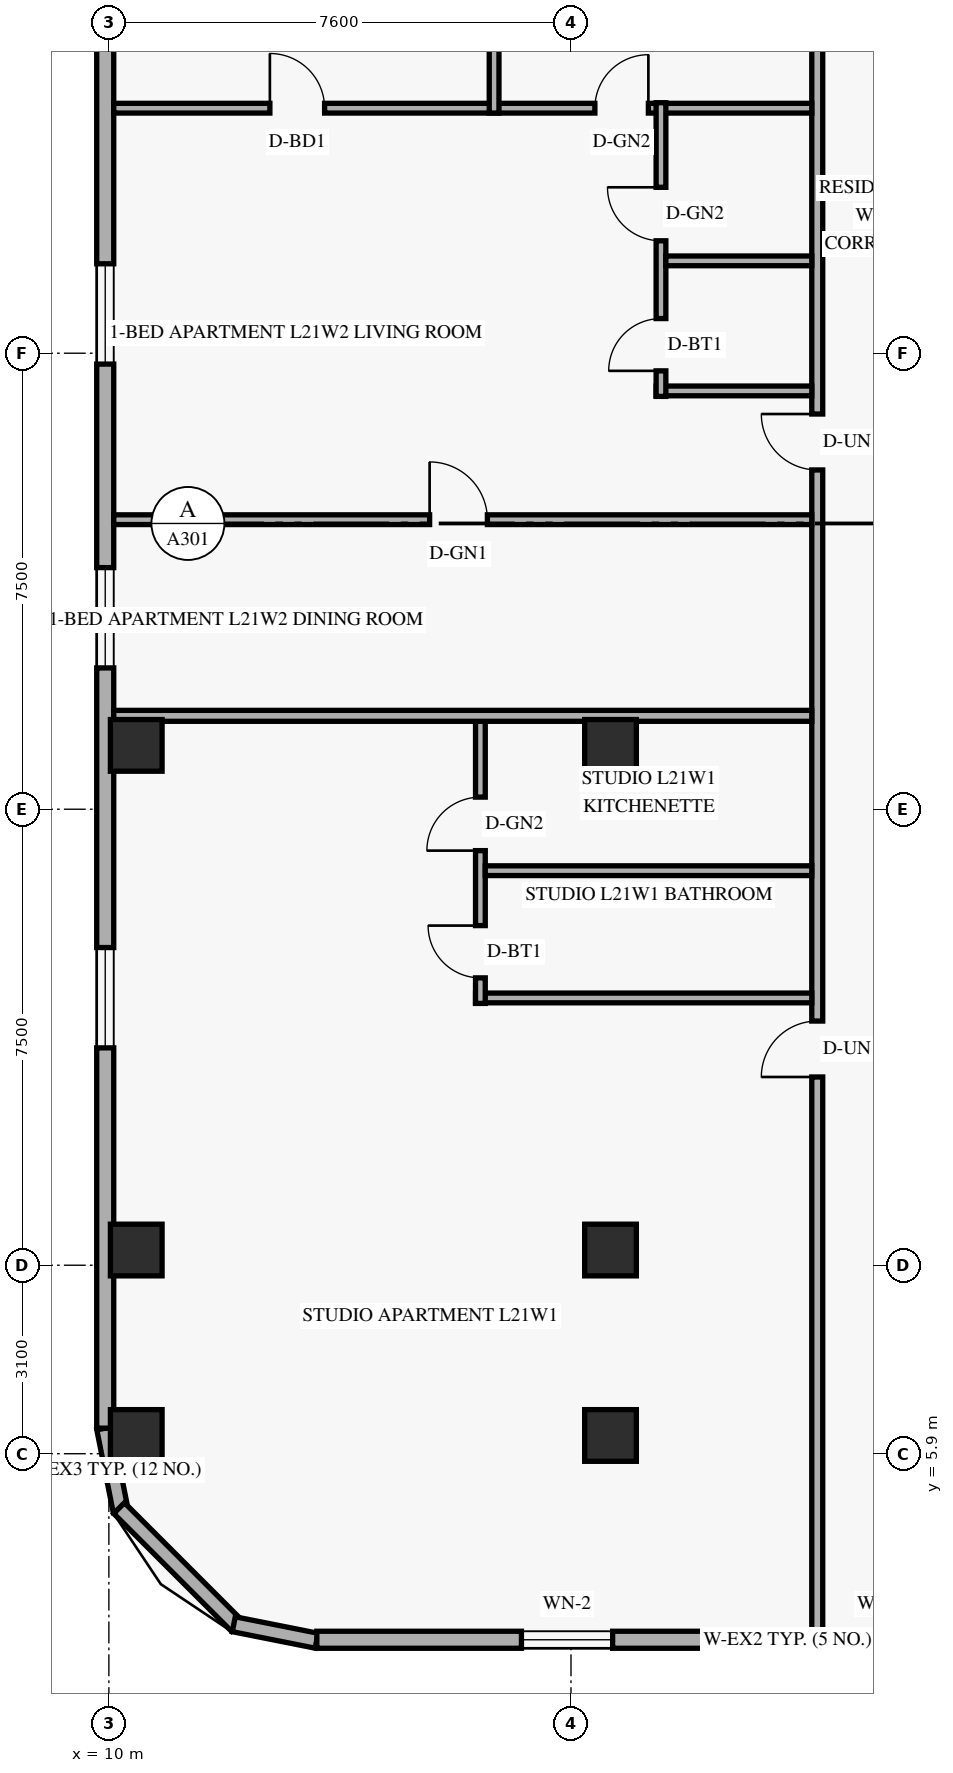
"""IFC4 building model, lengths in metres.
Left out: names, types, materials, properties, quantities, classifications, styles, units other than length and angle.
Written with IfcOpenShell. Run it as: python <this file> out.ifc"""

import sys

from ifc_helpers import new_model, si_unit, direction, frame, frame_2d, origin, origin_2d, place, context, subcontext, project, spatial, rectangle, extrude, element, fill, save


model = new_model("IFC4")
c1 = context("Model", 3, precision=1e-05, world=origin(), true_north=direction((0.0, 1.0)))
c2 = subcontext(c1, "Body", "Model", "MODEL_VIEW")
j1 = project(units=[si_unit("LENGTHUNIT", "METRE"), si_unit("PLANEANGLEUNIT", "RADIAN")], contexts=[c1])
p1 = place(None, origin())
s1 = spatial("IfcSite", under=j1, at=p1, CompositionType="ELEMENT")
p2 = place(p1, origin())
s2 = spatial("IfcBuilding", under=s1, at=p2, CompositionType="ELEMENT")
p3 = place(p2, frame((0.0, 0.0, 84.0)))
s3 = spatial("IfcBuildingStorey", under=s2, at=p3, CompositionType="ELEMENT", Elevation=84.0)
for number, where, z_axis, x_axis in (
    (1, (10.45, 6.2, 0.0), (0.0, 0.0, 1.0), (1.0, 0.0, 0.0)),
    (2, (10.45, 9.25, 0.0), (0.0, 0.0, 1.0), (1.0, 0.0, 0.0)),
    (3, (10.45, 17.55, 0.0), (0.0, 0.0, 1.0), (1.0, 0.0, 0.0)),
    (4, (18.25, 6.2, 0.0), (0.0, 0.0, 1.0), (1.0, 0.0, 0.0)),
    (5, (18.25, 9.25, 0.0), (0.0, 0.0, 1.0), (1.0, 0.0, 0.0)),
    (6, (18.25, 17.55, 0.0), (0.0, 0.0, 1.0), (1.0, 0.0, 0.0)),
):
    element("IfcColumn", number, at=place(p3, frame(where, z_axis=z_axis, x_axis=x_axis)), inside=s3, PredefinedType="COLUMN", context=c2, shape_type="SweptSolid", body=[
        extrude(rectangle(XDim=0.85, YDim=0.85, at=origin_2d()), origin(), (0.0, 0.0, 1.0), 3.6),
    ])
p4 = place(p3, frame((9.924, 6.316, 0.0), z_axis=(0.0, 0.0, 1.0), x_axis=(0.195000137217, -0.980803214965, 0.0)))
e7 = element("IfcWall", 7, at=p4, inside=s3, PredefinedType="SOLIDWALL", context=c2, shape_type="SweptSolid", body=[
    extrude(rectangle(XDim=1.388, YDim=0.25, at=frame_2d((0.694, 0.0))), origin(), (0.0, 0.0, 1.0), 3.36),
])
p5 = place(p3, frame((10.168, 5.005, 0.0), z_axis=(0.0, 0.0, 1.0), x_axis=(0.707151344399, -0.707062215165, 0.0)))
e8 = element("IfcWall", 8, at=p5, inside=s3, PredefinedType="SOLIDWALL", context=c2, shape_type="SweptSolid", body=[
    extrude(rectangle(XDim=2.739, YDim=0.25, at=frame_2d((1.37, 0.0))), origin(), (0.0, 0.0, 1.0), 3.36),
])
p6 = place(p3, frame((12.054, 3.095, 0.0), z_axis=(0.0, 0.0, 1.0), x_axis=(0.980809899341, -0.19496651342, 0.0)))
e9 = element("IfcWall", 9, at=p6, inside=s3, PredefinedType="SOLIDWALL", context=c2, shape_type="SweptSolid", body=[
    extrude(rectangle(XDim=1.389, YDim=0.25, at=frame_2d((0.694, 0.0))), origin(), (0.0, 0.0, 1.0), 3.36),
])
p7 = place(p3, frame((13.42, 2.84, 0.0), z_axis=(0.0, 0.0, 1.0), x_axis=(1.0, 0.0, 0.0)))
e10 = element("IfcWall", 10, at=p7, inside=s3, PredefinedType="SOLIDWALL", context=c2, shape_type="SweptSolid", body=[
    extrude(rectangle(XDim=15.481, YDim=0.28, at=frame_2d((7.741, 0.0))), origin(), (0.0, 0.0, 1.0), 3.36),
])
p8 = place(p7, frame((3.365, 0.0, 0.85)))
e11 = element("IfcOpeningElement", 11, at=p8, cuts=e10, PredefinedType="OPENING", context=c2, shape_type="SweptSolid", body=[
    extrude(rectangle(XDim=1.5, YDim=1.55, at=frame_2d((0.75, 0.775))), frame((0.0, 0.15, 0.0), z_axis=(0.0, -1.0, 0.0), x_axis=(1.0, 0.0, 0.0)), (0.0, 0.0, 1.0), 0.3),
])
p9 = place(p7, frame((8.53, 0.0, 0.85)))
e12 = element("IfcOpeningElement", 12, at=p9, cuts=e10, PredefinedType="OPENING", context=c2, shape_type="SweptSolid", body=[
    extrude(rectangle(XDim=1.5, YDim=1.55, at=frame_2d((0.75, 0.775))), frame((0.0, 0.15, 0.0), z_axis=(0.0, -1.0, 0.0), x_axis=(1.0, 0.0, 0.0)), (0.0, 0.0, 1.0), 0.3),
])
p10 = place(p7, frame((12.156, 0.0, 0.85)))
e13 = element("IfcOpeningElement", 13, at=p10, cuts=e10, PredefinedType="OPENING", context=c2, shape_type="SweptSolid", body=[
    extrude(rectangle(XDim=1.5, YDim=1.55, at=frame_2d((0.75, 0.775))), frame((0.0, 0.15, 0.0), z_axis=(0.0, -1.0, 0.0), x_axis=(1.0, 0.0, 0.0)), (0.0, 0.0, 1.0), 0.3),
])
p11 = place(p3, frame((9.94, 41.68, 0.0), z_axis=(0.0, 0.0, 1.0), x_axis=(0.0, -1.0, 0.0)))
e14 = element("IfcWall", 14, at=p11, inside=s3, PredefinedType="SOLIDWALL", context=c2, shape_type="SweptSolid", body=[
    extrude(rectangle(XDim=35.36, YDim=0.28, at=frame_2d((17.68, 0.0))), origin(), (0.0, 0.0, 1.0), 3.36),
])
p12 = place(p11, frame((27.455, 0.0, 0.85)))
e15 = element("IfcOpeningElement", 15, at=p12, cuts=e14, PredefinedType="OPENING", context=c2, shape_type="SweptSolid", body=[
    extrude(rectangle(XDim=1.65, YDim=1.6, at=frame_2d((0.825, 0.8))), frame((0.0, 0.15, 0.0), z_axis=(0.0, -1.0, 0.0), x_axis=(1.0, 0.0, 0.0)), (0.0, 0.0, 1.0), 0.3),
])
p13 = place(p11, frame((21.206, 0.0, 0.85)))
e16 = element("IfcOpeningElement", 16, at=p13, cuts=e14, PredefinedType="OPENING", context=c2, shape_type="SweptSolid", body=[
    extrude(rectangle(XDim=1.65, YDim=1.6, at=frame_2d((0.825, 0.8))), frame((0.0, 0.15, 0.0), z_axis=(0.0, -1.0, 0.0), x_axis=(1.0, 0.0, 0.0)), (0.0, 0.0, 1.0), 0.3),
])
p14 = place(p11, frame((16.209, 0.0, 0.85)))
e17 = element("IfcOpeningElement", 17, at=p14, cuts=e14, PredefinedType="OPENING", context=c2, shape_type="SweptSolid", body=[
    extrude(rectangle(XDim=1.65, YDim=1.6, at=frame_2d((0.825, 0.8))), frame((0.0, 0.15, 0.0), z_axis=(0.0, -1.0, 0.0), x_axis=(1.0, 0.0, 0.0)), (0.0, 0.0, 1.0), 0.3),
])
p15 = place(p11, frame((9.5, 0.0, 0.85)))
e18 = element("IfcOpeningElement", 18, at=p15, cuts=e14, PredefinedType="OPENING", context=c2, shape_type="SweptSolid", body=[
    extrude(rectangle(XDim=1.2, YDim=1.5, at=frame_2d((0.6, 0.75))), frame((0.0, 0.15, 0.0), z_axis=(0.0, -1.0, 0.0), x_axis=(1.0, 0.0, 0.0)), (0.0, 0.0, 1.0), 0.3),
])
p16 = place(p11, frame((5.44, 0.0, 0.85)))
e19 = element("IfcOpeningElement", 19, at=p16, cuts=e14, PredefinedType="OPENING", context=c2, shape_type="SweptSolid", body=[
    extrude(rectangle(XDim=1.65, YDim=1.6, at=frame_2d((0.825, 0.8))), frame((0.0, 0.15, 0.0), z_axis=(0.0, -1.0, 0.0), x_axis=(1.0, 0.0, 0.0)), (0.0, 0.0, 1.0), 0.3),
])
p17 = place(p3, frame((21.65, 2.98, 0.0), z_axis=(0.0, 0.0, 1.0), x_axis=(0.0, 1.0, 0.0)))
e20 = element("IfcWall", 20, at=p17, inside=s3, PredefinedType="STANDARD", context=c2, shape_type="SweptSolid", body=[
    extrude(rectangle(XDim=42.04, YDim=0.18, at=frame_2d((21.02, 0.0))), origin(), (0.0, 0.0, 1.0), 2.731),
])
p18 = place(p17, frame((9.116, 0.0, 0.0)))
e21 = element("IfcOpeningElement", 21, at=p18, cuts=e20, PredefinedType="OPENING", context=c2, shape_type="SweptSolid", body=[
    extrude(rectangle(XDim=0.92, YDim=2.15, at=frame_2d((0.46, 1.075))), frame((0.0, 0.1, 0.0), z_axis=(0.0, -1.0, 0.0), x_axis=(1.0, 0.0, 0.0)), (0.0, 0.0, 1.0), 0.2),
])
p19 = place(p17, frame((19.1, 0.0, 0.0)))
e22 = element("IfcOpeningElement", 22, at=p19, cuts=e20, PredefinedType="OPENING", context=c2, shape_type="SweptSolid", body=[
    extrude(rectangle(XDim=0.92, YDim=2.15, at=frame_2d((0.46, 1.075))), frame((0.0, 0.1, 0.0), z_axis=(0.0, -1.0, 0.0), x_axis=(1.0, 0.0, 0.0)), (0.0, 0.0, 1.0), 0.2),
])
p20 = place(p17, frame((32.201, 0.0, 0.0)))
e23 = element("IfcOpeningElement", 23, at=p20, cuts=e20, PredefinedType="OPENING", context=c2, shape_type="SweptSolid", body=[
    extrude(rectangle(XDim=0.92, YDim=2.15, at=frame_2d((0.46, 1.075))), frame((0.0, 0.1, 0.0), z_axis=(0.0, -1.0, 0.0), x_axis=(1.0, 0.0, 0.0)), (0.0, 0.0, 1.0), 0.2),
])
p21 = place(p3, frame((16.03, 13.396, 0.0), z_axis=(0.0, 0.0, 1.0), x_axis=(1.0, 0.0, 0.0)))
e24 = element("IfcWall", 24, at=p21, inside=s3, PredefinedType="PLUMBINGWALL", context=c2, shape_type="SweptSolid", body=[
    extrude(rectangle(XDim=5.53, YDim=0.16, at=frame_2d((2.765, 0.0))), origin(), (0.0, 0.0, 1.0), 2.731),
])
p22 = place(p3, frame((16.11, 13.306, 0.0), z_axis=(0.0, 0.0, 1.0), x_axis=(0.0, 1.0, 0.0)))
e25 = element("IfcWall", 25, at=p22, inside=s3, PredefinedType="PLUMBINGWALL", context=c2, shape_type="SweptSolid", body=[
    extrude(rectangle(XDim=4.73, YDim=0.16, at=frame_2d((2.365, 0.0))), origin(), (0.0, 0.0, 1.0), 2.731),
])
p23 = place(p22, frame((0.42, 0.0, 0.0)))
e26 = element("IfcOpeningElement", 26, at=p23, cuts=e25, PredefinedType="OPENING", context=c2, shape_type="SweptSolid", body=[
    extrude(rectangle(XDim=0.86, YDim=2.12, at=frame_2d((0.43, 1.06))), frame((0.0, 0.09, 0.0), z_axis=(0.0, -1.0, 0.0), x_axis=(1.0, 0.0, 0.0)), (0.0, 0.0, 1.0), 0.18),
])
p24 = place(p22, frame((2.513, 0.0, 0.0)))
e27 = element("IfcOpeningElement", 27, at=p24, cuts=e25, PredefinedType="OPENING", context=c2, shape_type="SweptSolid", body=[
    extrude(rectangle(XDim=0.88, YDim=2.12, at=frame_2d((0.44, 1.06))), frame((0.0, 0.09, 0.0), z_axis=(0.0, -1.0, 0.0), x_axis=(1.0, 0.0, 0.0)), (0.0, 0.0, 1.0), 0.18),
])
p25 = place(p3, frame((16.19, 15.489, 0.0), z_axis=(0.0, 0.0, 1.0), x_axis=(1.0, 0.0, 0.0)))
e28 = element("IfcWall", 28, at=p25, inside=s3, PredefinedType="PLUMBINGWALL", context=c2, shape_type="SweptSolid", body=[
    extrude(rectangle(XDim=5.37, YDim=0.16, at=frame_2d((2.685, 0.0))), origin(), (0.0, 0.0, 1.0), 2.731),
])
p26 = place(p3, frame((10.08, 18.036, 0.0), z_axis=(0.0, 0.0, 1.0), x_axis=(1.0, 0.0, 0.0)))
e29 = element("IfcWall", 29, at=p26, inside=s3, PredefinedType="PARTITIONING", context=c2, shape_type="SweptSolid", body=[
    extrude(rectangle(XDim=11.48, YDim=0.18, at=frame_2d((5.74, 0.0))), origin(), (0.0, 0.0, 1.0), 2.731),
])
p27 = place(p3, frame((10.08, 28.03, 0.0), z_axis=(0.0, 0.0, 1.0), x_axis=(1.0, 0.0, 0.0)))
e30 = element("IfcWall", 30, at=p27, inside=s3, PredefinedType="PARTITIONING", context=c2, shape_type="SweptSolid", body=[
    extrude(rectangle(XDim=11.48, YDim=0.16, at=frame_2d((5.74, 0.0))), origin(), (0.0, 0.0, 1.0), 2.731),
])
p28 = place(p27, frame((7.913, 0.0, 0.0)))
e31 = element("IfcOpeningElement", 31, at=p28, cuts=e30, PredefinedType="OPENING", context=c2, shape_type="SweptSolid", body=[
    extrude(rectangle(XDim=0.88, YDim=2.12, at=frame_2d((0.44, 1.06))), frame((0.0, 0.09, 0.0), z_axis=(0.0, -1.0, 0.0), x_axis=(1.0, 0.0, 0.0)), (0.0, 0.0, 1.0), 0.18),
])
p29 = place(p27, frame((2.568, 0.0, 0.0)))
e32 = element("IfcOpeningElement", 32, at=p29, cuts=e30, PredefinedType="OPENING", context=c2, shape_type="SweptSolid", body=[
    extrude(rectangle(XDim=0.9, YDim=2.14, at=frame_2d((0.45, 1.07))), frame((0.0, 0.09, 0.0), z_axis=(0.0, -1.0, 0.0), x_axis=(1.0, 0.0, 0.0)), (0.0, 0.0, 1.0), 0.18),
])
p30 = place(p3, frame((19.0, 23.38, 0.0), z_axis=(0.0, 0.0, 1.0), x_axis=(1.0, 0.0, 0.0)))
e33 = element("IfcWall", 33, at=p30, inside=s3, PredefinedType="PLUMBINGWALL", context=c2, shape_type="SweptSolid", body=[
    extrude(rectangle(XDim=2.56, YDim=0.16, at=frame_2d((1.28, 0.0))), origin(), (0.0, 0.0, 1.0), 3.36),
])
p31 = place(p3, frame((19.08, 23.29, 0.0), z_axis=(0.0, 0.0, 1.0), x_axis=(0.0, 1.0, 0.0)))
e34 = element("IfcWall", 34, at=p31, inside=s3, PredefinedType="PLUMBINGWALL", context=c2, shape_type="SweptSolid", body=[
    extrude(rectangle(XDim=4.83, YDim=0.16, at=frame_2d((2.415, 0.0))), origin(), (0.0, 0.0, 1.0), 3.36),
])
p32 = place(p31, frame((0.42, 0.0, 0.0)))
e35 = element("IfcOpeningElement", 35, at=p32, cuts=e34, PredefinedType="OPENING", context=c2, shape_type="SweptSolid", body=[
    extrude(rectangle(XDim=0.86, YDim=2.12, at=frame_2d((0.43, 1.06))), frame((0.0, 0.09, 0.0), z_axis=(0.0, -1.0, 0.0), x_axis=(1.0, 0.0, 0.0)), (0.0, 0.0, 1.0), 0.18),
])
p33 = place(p31, frame((2.559, 0.0, 0.0)))
e36 = element("IfcOpeningElement", 36, at=p33, cuts=e34, PredefinedType="OPENING", context=c2, shape_type="SweptSolid", body=[
    extrude(rectangle(XDim=0.88, YDim=2.12, at=frame_2d((0.44, 1.06))), frame((0.0, 0.09, 0.0), z_axis=(0.0, -1.0, 0.0), x_axis=(1.0, 0.0, 0.0)), (0.0, 0.0, 1.0), 0.18),
])
p34 = place(p3, frame((19.16, 25.519, 0.0), z_axis=(0.0, 0.0, 1.0), x_axis=(1.0, 0.0, 0.0)))
e37 = element("IfcWall", 37, at=p34, inside=s3, PredefinedType="PLUMBINGWALL", context=c2, shape_type="SweptSolid", body=[
    extrude(rectangle(XDim=2.4, YDim=0.16, at=frame_2d((1.2, 0.0))), origin(), (0.0, 0.0, 1.0), 3.36),
])
p35 = place(p3, frame((10.08, 21.262, 0.0), z_axis=(0.0, 0.0, 1.0), x_axis=(1.0, 0.0, 0.0)))
e38 = element("IfcWall", 38, at=p35, inside=s3, PredefinedType="PARTITIONING", context=c2, shape_type="SweptSolid", body=[
    extrude(rectangle(XDim=11.48, YDim=0.16, at=frame_2d((5.74, 0.0))), origin(), (0.0, 0.0, 1.0), 2.731),
])
p36 = place(p35, frame((5.195, 0.0, 0.0)))
e39 = element("IfcOpeningElement", 39, at=p36, cuts=e38, PredefinedType="OPENING", context=c2, shape_type="SweptSolid", body=[
    extrude(rectangle(XDim=0.95, YDim=2.15, at=frame_2d((0.475, 1.075))), frame((0.0, 0.09, 0.0), z_axis=(0.0, -1.0, 0.0), x_axis=(1.0, 0.0, 0.0)), (0.0, 0.0, 1.0), 0.18),
])
p37 = place(p3, frame((16.335, 27.95, 0.0), z_axis=(0.0, 0.0, 1.0), x_axis=(0.0, 1.0, 0.0)))
e40 = element("IfcWall", 40, at=p37, inside=s3, PredefinedType="PARTITIONING", context=c2, shape_type="SweptSolid", body=[
    extrude(rectangle(XDim=4.96, YDim=0.16, at=frame_2d((2.48, 0.0))), origin(), (0.0, 0.0, 1.0), 2.731),
])
p38 = place(p8, origin())
e41 = element("IfcWindow", 41, at=p38, inside=s3, PartitioningType="SINGLE_PANEL", PredefinedType="WINDOW", context=c2, shape_type="SweptSolid", body=[
    extrude(rectangle(XDim=1.5, YDim=1.55, at=frame_2d((0.75, 0.775))), frame((0.0, 0.03, 0.0), z_axis=(0.0, -1.0, 0.0), x_axis=(1.0, 0.0, 0.0)), (0.0, 0.0, 1.0), 0.06),
])
fill(e11, e41)
p39 = place(p9, origin())
e42 = element("IfcWindow", 42, at=p39, inside=s3, PartitioningType="SINGLE_PANEL", PredefinedType="WINDOW", context=c2, shape_type="SweptSolid", body=[
    extrude(rectangle(XDim=1.5, YDim=1.55, at=frame_2d((0.75, 0.775))), frame((0.0, 0.03, 0.0), z_axis=(0.0, -1.0, 0.0), x_axis=(1.0, 0.0, 0.0)), (0.0, 0.0, 1.0), 0.06),
])
fill(e12, e42)
p40 = place(p12, origin())
e43 = element("IfcWindow", 43, at=p40, inside=s3, PartitioningType="SINGLE_PANEL", PredefinedType="WINDOW", context=c2, shape_type="SweptSolid", body=[
    extrude(rectangle(XDim=1.65, YDim=1.6, at=frame_2d((0.825, 0.8))), frame((0.0, 0.03, 0.0), z_axis=(0.0, -1.0, 0.0), x_axis=(1.0, 0.0, 0.0)), (0.0, 0.0, 1.0), 0.06),
])
fill(e15, e43)
p41 = place(p13, origin())
e44 = element("IfcWindow", 44, at=p41, inside=s3, PartitioningType="SINGLE_PANEL", PredefinedType="WINDOW", context=c2, shape_type="SweptSolid", body=[
    extrude(rectangle(XDim=1.65, YDim=1.6, at=frame_2d((0.825, 0.8))), frame((0.0, 0.03, 0.0), z_axis=(0.0, -1.0, 0.0), x_axis=(1.0, 0.0, 0.0)), (0.0, 0.0, 1.0), 0.06),
])
fill(e16, e44)
p42 = place(p14, origin())
e45 = element("IfcWindow", 45, at=p42, inside=s3, PartitioningType="SINGLE_PANEL", PredefinedType="WINDOW", context=c2, shape_type="SweptSolid", body=[
    extrude(rectangle(XDim=1.65, YDim=1.6, at=frame_2d((0.825, 0.8))), frame((0.0, 0.03, 0.0), z_axis=(0.0, -1.0, 0.0), x_axis=(1.0, 0.0, 0.0)), (0.0, 0.0, 1.0), 0.06),
])
fill(e17, e45)
p43 = place(p18, origin())
e46 = element("IfcDoor", 46, at=p43, inside=s3, OperationType="SINGLE_SWING_LEFT", PredefinedType="DOOR", context=c2, shape_type="SweptSolid", body=[
    extrude(rectangle(XDim=0.92, YDim=2.15, at=frame_2d((0.46, 1.075))), frame((0.0, 0.025, 0.0), z_axis=(0.0, -1.0, 0.0), x_axis=(1.0, 0.0, 0.0)), (0.0, 0.0, 1.0), 0.05),
])
fill(e21, e46)
p44 = place(p23, origin())
e47 = element("IfcDoor", 47, at=p44, inside=s3, OperationType="SINGLE_SWING_RIGHT", PredefinedType="DOOR", context=c2, shape_type="SweptSolid", body=[
    extrude(rectangle(XDim=0.86, YDim=2.12, at=frame_2d((0.43, 1.06))), frame((0.0, 0.025, 0.0), z_axis=(0.0, -1.0, 0.0), x_axis=(1.0, 0.0, 0.0)), (0.0, 0.0, 1.0), 0.05),
])
fill(e26, e47)
p45 = place(p24, origin())
e48 = element("IfcDoor", 48, at=p45, inside=s3, OperationType="SINGLE_SWING_LEFT", PredefinedType="DOOR", context=c2, shape_type="SweptSolid", body=[
    extrude(rectangle(XDim=0.88, YDim=2.12, at=frame_2d((0.44, 1.06))), frame((0.0, 0.025, 0.0), z_axis=(0.0, -1.0, 0.0), x_axis=(1.0, 0.0, 0.0)), (0.0, 0.0, 1.0), 0.05),
])
fill(e27, e48)
p46 = place(p36, origin())
e49 = element("IfcDoor", 49, at=p46, inside=s3, OperationType="SINGLE_SWING_LEFT", PredefinedType="DOOR", context=c2, shape_type="SweptSolid", body=[
    extrude(rectangle(XDim=0.95, YDim=2.15, at=frame_2d((0.475, 1.075))), frame((0.0, 0.025, 0.0), z_axis=(0.0, -1.0, 0.0), x_axis=(1.0, 0.0, 0.0)), (0.0, 0.0, 1.0), 0.05),
])
fill(e39, e49)
p47 = place(p19, origin())
e50 = element("IfcDoor", 50, at=p47, inside=s3, OperationType="SINGLE_SWING_RIGHT", PredefinedType="DOOR", context=c2, shape_type="SweptSolid", body=[
    extrude(rectangle(XDim=0.92, YDim=2.15, at=frame_2d((0.46, 1.075))), frame((0.0, 0.025, 0.0), z_axis=(0.0, -1.0, 0.0), x_axis=(1.0, 0.0, 0.0)), (0.0, 0.0, 1.0), 0.05),
])
fill(e22, e50)
p48 = place(p32, origin())
e51 = element("IfcDoor", 51, at=p48, inside=s3, OperationType="SINGLE_SWING_LEFT", PredefinedType="DOOR", context=c2, shape_type="SweptSolid", body=[
    extrude(rectangle(XDim=0.86, YDim=2.12, at=frame_2d((0.43, 1.06))), frame((0.0, 0.025, 0.0), z_axis=(0.0, -1.0, 0.0), x_axis=(1.0, 0.0, 0.0)), (0.0, 0.0, 1.0), 0.05),
])
fill(e35, e51)
p49 = place(p33, origin())
e52 = element("IfcDoor", 52, at=p49, inside=s3, OperationType="SINGLE_SWING_RIGHT", PredefinedType="DOOR", context=c2, shape_type="SweptSolid", body=[
    extrude(rectangle(XDim=0.88, YDim=2.12, at=frame_2d((0.44, 1.06))), frame((0.0, 0.025, 0.0), z_axis=(0.0, -1.0, 0.0), x_axis=(1.0, 0.0, 0.0)), (0.0, 0.0, 1.0), 0.05),
])
fill(e36, e52)
p50 = place(p28, origin())
e53 = element("IfcDoor", 53, at=p50, inside=s3, OperationType="SINGLE_SWING_RIGHT", PredefinedType="DOOR", context=c2, shape_type="SweptSolid", body=[
    extrude(rectangle(XDim=0.88, YDim=2.12, at=frame_2d((0.44, 1.06))), frame((0.0, 0.025, 0.0), z_axis=(0.0, -1.0, 0.0), x_axis=(1.0, 0.0, 0.0)), (0.0, 0.0, 1.0), 0.05),
])
fill(e31, e53)
p51 = place(p29, origin())
e54 = element("IfcDoor", 54, at=p51, inside=s3, OperationType="SINGLE_SWING_LEFT", PredefinedType="DOOR", context=c2, shape_type="SweptSolid", body=[
    extrude(rectangle(XDim=0.9, YDim=2.14, at=frame_2d((0.45, 1.07))), frame((0.0, 0.025, 0.0), z_axis=(0.0, -1.0, 0.0), x_axis=(1.0, 0.0, 0.0)), (0.0, 0.0, 1.0), 0.05),
])
fill(e32, e54)
save(model, sys.argv[1])
